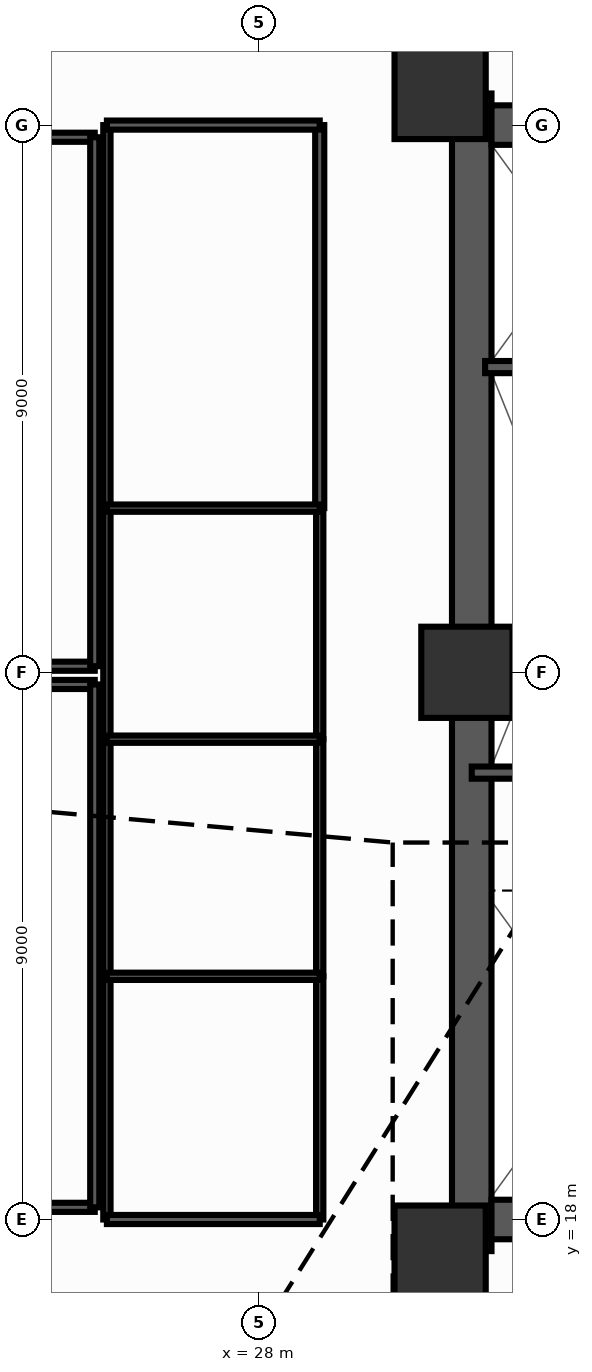
"""IFC4 building model, lengths in metres.
Left out: names, types, materials, properties, quantities, classifications, styles, units other than length and angle.
Written with IfcOpenShell. Run it as: python <this file> out.ifc"""

import sys

from ifc_helpers import new_model, si_unit, direction, frame, frame_2d, origin, origin_2d, place, context, subcontext, project, spatial, rectangle, extrude, source, transform, mapped, element, fill, save


model = new_model("IFC4")
c1 = context("Model", 3, precision=1e-05, world=origin(), true_north=direction((0.0, 1.0)))
c2 = subcontext(c1, "Body", "Model", "MODEL_VIEW")
j1 = project(units=[si_unit("LENGTHUNIT", "METRE"), si_unit("PLANEANGLEUNIT", "RADIAN")], contexts=[c1])
p1 = place(None, origin())
s1 = spatial("IfcSite", under=j1, at=p1, CompositionType="ELEMENT")
p2 = place(p1, origin())
s2 = spatial("IfcBuilding", under=s1, at=p2, CompositionType="ELEMENT")
p3 = place(p2, origin())
s3 = spatial("IfcBuildingStorey", under=s2, at=p3, CompositionType="ELEMENT", Elevation=0.0)
p4 = place(p3, frame((31.5, 17.48, 0.0), z_axis=(0.0, 0.0, 1.0), x_axis=(0.0, 1.0, 0.0)))
e1 = element("IfcWall", 1, at=p4, inside=s3, PredefinedType="SHEAR", context=c2, shape_type="SweptSolid", body=[
    extrude(rectangle(XDim=19.04, YDim=0.65, at=frame_2d((9.52, 0.0))), origin(), (0.0, 0.0, 1.0), 4.2),
])
p5 = place(p4, frame((6.32, 0.0, 0.0)))
e2 = element("IfcOpeningElement", 2, at=p5, cuts=e1, PredefinedType="OPENING", context=c2, shape_type="SweptSolid", body=[
    extrude(rectangle(XDim=1.1, YDim=2.15, at=frame_2d((0.55, 1.075))), frame((0.0, 0.337, 0.0), z_axis=(0.0, -1.0, 0.0), x_axis=(1.0, 0.0, 0.0)), (0.0, 0.0, 1.0), 0.674),
])
p6 = place(p3, frame((31.825, 18.0, 0.0), z_axis=(0.0, 0.0, 1.0), x_axis=(1.0, 0.0, 0.0)))
e3 = element("IfcWall", 3, at=p6, inside=s3, PredefinedType="SHEAR", context=c2, shape_type="SweptSolid", body=[
    extrude(rectangle(XDim=12.35, YDim=0.65, at=frame_2d((6.175, 0.0))), origin(), (0.0, 0.0, 1.0), 4.2),
])
p7 = place(p3, frame((31.825, 36.0, 0.0), z_axis=(0.0, 0.0, 1.0), x_axis=(1.0, 0.0, 0.0)))
e4 = element("IfcWall", 4, at=p7, inside=s3, PredefinedType="SHEAR", context=c2, shape_type="SweptSolid", body=[
    extrude(rectangle(XDim=12.35, YDim=0.65, at=frame_2d((6.175, 0.0))), origin(), (0.0, 0.0, 1.0), 4.2),
])
p8 = place(p7, frame((5.125, 0.0, 0.0), z_axis=(0.0, 0.0, 1.0), x_axis=(-1.0, 0.0, 0.0)))
e5 = element("IfcOpeningElement", 5, at=p8, cuts=e4, PredefinedType="OPENING", context=c2, shape_type="SweptSolid", body=[
    extrude(rectangle(XDim=1.4, YDim=2.15, at=frame_2d((0.7, 1.075))), frame((0.0, 0.337, 0.0), z_axis=(0.0, -1.0, 0.0), x_axis=(1.0, 0.0, 0.0)), (0.0, 0.0, 1.0), 0.674),
])
m1 = source(origin(), c2, "Body", "SweptSolid", [
    extrude(rectangle(XDim=1.5, YDim=1.5, at=origin_2d()), origin(), (0.0, 0.0, 1.0), 4.2),
])
for number, where, z_axis, x_axis in (
    (6, (30.98, 17.48, 0.0), (0.0, 0.0, 1.0), (1.0, 0.0, 0.0)),
    (7, (30.98, 36.52, 0.0), (0.0, 0.0, 1.0), (1.0, 0.0, 0.0)),
    (8, (31.42, 27.0, 0.0), (0.0, 0.0, 1.0), (1.0, 0.0, 0.0)),
):
    element("IfcColumn", number, at=place(p3, frame(where, z_axis=z_axis, x_axis=x_axis)), inside=s3, PredefinedType="COLUMN", context=c2, shape_type="MappedRepresentation", body=[
        mapped(m1, transform((0.0, 0.0, 0.0), scale=1.0)),
    ])
p9 = place(p3, frame((31.5, 25.35, 0.0), z_axis=(0.0, 0.0, 1.0), x_axis=(1.0, 0.0, 0.0)))
e9 = element("IfcWall", 9, at=p9, inside=s3, PredefinedType="SOLIDWALL", context=c2, shape_type="SweptSolid", body=[
    extrude(rectangle(XDim=3.93, YDim=0.2, at=frame_2d((1.965, 0.0))), origin(), (0.0, 0.0, 1.0), 3.92),
])
p10 = place(p3, frame((31.72, 32.02, 0.0), z_axis=(0.0, 0.0, 1.0), x_axis=(1.0, 0.0, 0.0)))
e10 = element("IfcWall", 10, at=p10, inside=s3, PredefinedType="PARTITIONING", context=c2, shape_type="SweptSolid", body=[
    extrude(rectangle(XDim=2.8, YDim=0.2, at=frame_2d((1.4, 0.0))), origin(), (0.0, 0.0, 1.0), 3.92),
])
p11 = place(p3, frame((25.5, 18.0, 0.0), z_axis=(0.0, 0.0, 1.0), x_axis=(0.0, 1.0, 0.0)))
e11 = element("IfcWall", 11, at=p11, inside=s3, PredefinedType="PARTITIONING", context=c2, shape_type="SweptSolid", body=[
    extrude(rectangle(XDim=18.0, YDim=0.12, at=frame_2d((9.0, 0.0))), origin(), (0.0, 0.0, 1.0), 3.92),
])
p12 = place(p3, frame((29.0, 18.0, 0.0), z_axis=(0.0, 0.0, 1.0), x_axis=(0.0, 1.0, 0.0)))
e12 = element("IfcWall", 12, at=p12, inside=s3, PredefinedType="PARTITIONING", context=c2, shape_type="SweptSolid", body=[
    extrude(rectangle(XDim=4.0, YDim=0.12, at=frame_2d((2.0, 0.0))), origin(), (0.0, 0.0, 1.0), 3.92),
])
p13 = place(p12, frame((1.55, 0.0, 0.0)))
e13 = element("IfcOpeningElement", 13, at=p13, cuts=e12, PredefinedType="OPENING", context=c2, shape_type="SweptSolid", body=[
    extrude(rectangle(XDim=0.9, YDim=2.1, at=frame_2d((0.45, 1.05))), frame((0.0, 0.072, 0.0), z_axis=(0.0, -1.0, 0.0), x_axis=(1.0, 0.0, 0.0)), (0.0, 0.0, 1.0), 0.144),
])
p14 = place(p3, frame((29.0, 22.0, 0.0), z_axis=(0.0, 0.0, 1.0), x_axis=(0.0, 1.0, 0.0)))
e14 = element("IfcWall", 14, at=p14, inside=s3, PredefinedType="PARTITIONING", context=c2, shape_type="SweptSolid", body=[
    extrude(rectangle(XDim=3.9, YDim=0.12, at=frame_2d((1.95, 0.0))), origin(), (0.0, 0.0, 1.0), 3.92),
])
p15 = place(p14, frame((1.5, 0.0, 0.0)))
e15 = element("IfcOpeningElement", 15, at=p15, cuts=e14, PredefinedType="OPENING", context=c2, shape_type="SweptSolid", body=[
    extrude(rectangle(XDim=0.9, YDim=2.1, at=frame_2d((0.45, 1.05))), frame((0.0, 0.072, 0.0), z_axis=(0.0, -1.0, 0.0), x_axis=(1.0, 0.0, 0.0)), (0.0, 0.0, 1.0), 0.144),
])
p16 = place(p3, frame((29.0, 25.9, 0.0), z_axis=(0.0, 0.0, 1.0), x_axis=(0.0, 1.0, 0.0)))
e16 = element("IfcWall", 16, at=p16, inside=s3, PredefinedType="PARTITIONING", context=c2, shape_type="SweptSolid", body=[
    extrude(rectangle(XDim=3.8, YDim=0.12, at=frame_2d((1.9, 0.0))), origin(), (0.0, 0.0, 1.0), 3.92),
])
p17 = place(p16, frame((1.4, 0.0, 0.0)))
e17 = element("IfcOpeningElement", 17, at=p17, cuts=e16, PredefinedType="OPENING", context=c2, shape_type="SweptSolid", body=[
    extrude(rectangle(XDim=1.0, YDim=2.1, at=frame_2d((0.5, 1.05))), frame((0.0, 0.072, 0.0), z_axis=(0.0, -1.0, 0.0), x_axis=(1.0, 0.0, 0.0)), (0.0, 0.0, 1.0), 0.144),
])
p18 = place(p3, frame((29.0, 29.7, 0.0), z_axis=(0.0, 0.0, 1.0), x_axis=(0.0, 1.0, 0.0)))
e18 = element("IfcWall", 18, at=p18, inside=s3, PredefinedType="PARTITIONING", context=c2, shape_type="SweptSolid", body=[
    extrude(rectangle(XDim=6.3, YDim=0.15, at=frame_2d((3.15, 0.0))), origin(), (0.0, 0.0, 1.0), 3.92),
])
p19 = place(p18, frame((2.75, 0.0, 0.0)))
e19 = element("IfcOpeningElement", 19, at=p19, cuts=e18, PredefinedType="OPENING", context=c2, shape_type="SweptSolid", body=[
    extrude(rectangle(XDim=0.8, YDim=2.05, at=frame_2d((0.4, 1.025))), frame((0.0, 0.087, 0.0), z_axis=(0.0, -1.0, 0.0), x_axis=(1.0, 0.0, 0.0)), (0.0, 0.0, 1.0), 0.174),
])
for number, where, z_axis, x_axis in (
    (20, (25.5, 22.0, 0.0), (0.0, 0.0, 1.0), (1.0, 0.0, 0.0)),
    (21, (25.5, 25.9, 0.0), (0.0, 0.0, 1.0), (1.0, 0.0, 0.0)),
    (22, (25.5, 29.7, 0.0), (0.0, 0.0, 1.0), (1.0, 0.0, 0.0)),
):
    element("IfcWall", number, at=place(p3, frame(where, z_axis=z_axis, x_axis=x_axis)), inside=s3, PredefinedType="PARTITIONING", context=c2, shape_type="SweptSolid", body=[
        extrude(rectangle(XDim=3.5, YDim=0.12, at=frame_2d((1.75, 0.0))), origin(), (0.0, 0.0, 1.0), 3.92),
    ])
for number, where, z_axis, x_axis in (
    (23, (25.5, 36.0, 0.0), (0.0, 0.0, 1.0), (1.0, 0.0, 0.0)),
    (24, (25.5, 18.0, 0.0), (0.0, 0.0, 1.0), (1.0, 0.0, 0.0)),
):
    element("IfcWall", number, at=place(p3, frame(where, z_axis=z_axis, x_axis=x_axis)), inside=s3, PredefinedType="PARTITIONING", context=c2, shape_type="SweptSolid", body=[
        extrude(rectangle(XDim=3.5, YDim=0.15, at=frame_2d((1.75, 0.0))), origin(), (0.0, 0.0, 1.0), 3.29),
    ])
for number, where, z_axis, x_axis in (
    (25, (11.6, 18.2, 0.0), (0.0, 0.0, 1.0), (1.0, 0.0, 0.0)),
    (26, (11.6, 26.8, 0.0), (0.0, 0.0, 1.0), (1.0, 0.0, 0.0)),
):
    element("IfcWall", number, at=place(p3, frame(where, z_axis=z_axis, x_axis=x_axis)), inside=s3, PredefinedType="PARTITIONING", context=c2, shape_type="SweptSolid", body=[
        extrude(rectangle(XDim=13.7, YDim=0.15, at=frame_2d((6.85, 0.0))), origin(), (0.0, 0.0, 1.0), 3.92),
    ])
p20 = place(p3, frame((25.3, 18.2, 0.0), z_axis=(0.0, 0.0, 1.0), x_axis=(0.0, 1.0, 0.0)))
e27 = element("IfcWall", 27, at=p20, inside=s3, PredefinedType="PARTITIONING", context=c2, shape_type="SweptSolid", body=[
    extrude(rectangle(XDim=8.6, YDim=0.15, at=frame_2d((4.3, 0.0))), origin(), (0.0, 0.0, 1.0), 3.92),
])
for number, where, z_axis, x_axis in (
    (28, (11.6, 27.1, 0.0), (0.0, 0.0, 1.0), (1.0, 0.0, 0.0)),
    (29, (11.6, 35.8, 0.0), (0.0, 0.0, 1.0), (1.0, 0.0, 0.0)),
):
    element("IfcWall", number, at=place(p3, frame(where, z_axis=z_axis, x_axis=x_axis)), inside=s3, PredefinedType="PARTITIONING", context=c2, shape_type="SweptSolid", body=[
        extrude(rectangle(XDim=13.7, YDim=0.15, at=frame_2d((6.85, 0.0))), origin(), (0.0, 0.0, 1.0), 3.92),
    ])
p21 = place(p3, frame((25.3, 27.1, 0.0), z_axis=(0.0, 0.0, 1.0), x_axis=(0.0, 1.0, 0.0)))
e30 = element("IfcWall", 30, at=p21, inside=s3, PredefinedType="PARTITIONING", context=c2, shape_type="SweptSolid", body=[
    extrude(rectangle(XDim=8.7, YDim=0.15, at=frame_2d((4.35, 0.0))), origin(), (0.0, 0.0, 1.0), 3.92),
])
m2 = source(origin(), c2, "Body", "SweptSolid", [
    extrude(rectangle(XDim=1.1, YDim=2.15, at=frame_2d((0.55, 1.075))), frame((0.0, 0.025, 0.0), z_axis=(0.0, -1.0, 0.0), x_axis=(1.0, 0.0, 0.0)), (0.0, 0.0, 1.0), 0.05),
])
p22 = place(p5, origin())
e31 = element("IfcDoor", 31, at=p22, inside=s3, OperationType="SINGLE_SWING_LEFT", PredefinedType="DOOR", context=c2, shape_type="MappedRepresentation", body=[
    mapped(m2, transform((0.0, 0.0, 0.0), scale=1.0)),
])
fill(e2, e31)
m3 = source(origin(), c2, "Body", "SweptSolid", [
    extrude(rectangle(XDim=0.9, YDim=2.1, at=frame_2d((0.45, 1.05))), frame((0.0, 0.025, 0.0), z_axis=(0.0, -1.0, 0.0), x_axis=(1.0, 0.0, 0.0)), (0.0, 0.0, 1.0), 0.05),
])
p23 = place(p13, origin())
e32 = element("IfcDoor", 32, at=p23, inside=s3, OperationType="SINGLE_SWING_LEFT", PredefinedType="DOOR", context=c2, shape_type="MappedRepresentation", body=[
    mapped(m3, transform((0.0, 0.0, 0.0), scale=1.0)),
])
fill(e13, e32)
p24 = place(p15, origin())
e33 = element("IfcDoor", 33, at=p24, inside=s3, OperationType="SINGLE_SWING_RIGHT", PredefinedType="DOOR", context=c2, shape_type="MappedRepresentation", body=[
    mapped(m3, transform((0.0, 0.0, 0.0), scale=1.0)),
])
fill(e15, e33)
m4 = source(origin(), c2, "Body", "SweptSolid", [
    extrude(rectangle(XDim=1.0, YDim=2.1, at=frame_2d((0.5, 1.05))), frame((0.0, 0.025, 0.0), z_axis=(0.0, -1.0, 0.0), x_axis=(1.0, 0.0, 0.0)), (0.0, 0.0, 1.0), 0.05),
])
p25 = place(p17, origin())
e34 = element("IfcDoor", 34, at=p25, inside=s3, OperationType="SINGLE_SWING_LEFT", PredefinedType="DOOR", context=c2, shape_type="MappedRepresentation", body=[
    mapped(m4, transform((0.0, 0.0, 0.0), scale=1.0)),
])
fill(e17, e34)
m5 = source(origin(), c2, "Body", "SweptSolid", [
    extrude(rectangle(XDim=0.8, YDim=2.05, at=frame_2d((0.4, 1.025))), frame((0.0, 0.025, 0.0), z_axis=(0.0, -1.0, 0.0), x_axis=(1.0, 0.0, 0.0)), (0.0, 0.0, 1.0), 0.05),
])
p26 = place(p19, origin())
e35 = element("IfcDoor", 35, at=p26, inside=s3, OperationType="SINGLE_SWING_RIGHT", PredefinedType="DOOR", context=c2, shape_type="MappedRepresentation", body=[
    mapped(m5, transform((0.0, 0.0, 0.0), scale=1.0)),
])
fill(e19, e35)
save(model, sys.argv[1])
